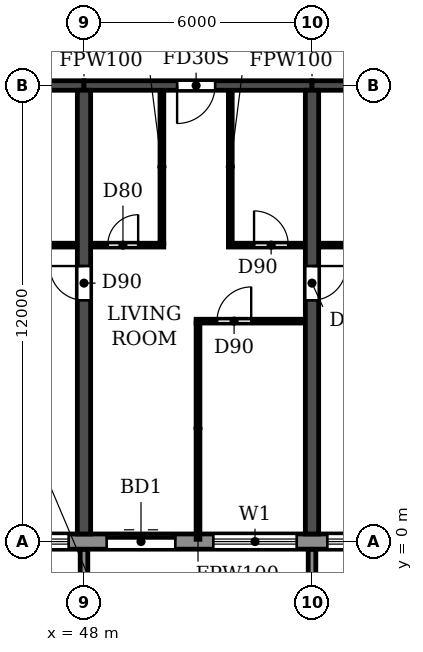
"""IFC4 building model, lengths in metres.
Left out: names, types, materials, properties, quantities, classifications, styles, units other than length and angle.
Written with IfcOpenShell. Run it as: python <this file> out.ifc"""

import sys

from ifc_helpers import new_model, si_unit, direction, frame, frame_2d, origin, place, context, subcontext, project, spatial, polyline, rectangle, outline, extrude, source, transform, mapped, element, fill, save


model = new_model("IFC4")
c1 = context("Model", 3, precision=1e-05, world=origin(), true_north=direction((0.0, 1.0)))
c2 = subcontext(c1, "Body", "Model", "MODEL_VIEW")
j1 = project(units=[si_unit("LENGTHUNIT", "METRE"), si_unit("PLANEANGLEUNIT", "RADIAN")], contexts=[c1])
p1 = place(None, origin())
s1 = spatial("IfcSite", under=j1, at=p1, CompositionType="ELEMENT")
p2 = place(p1, origin())
s2 = spatial("IfcBuilding", under=s1, at=p2, CompositionType="ELEMENT")
p3 = place(p2, frame((0.0, 0.0, 92.7)))
s3 = spatial("IfcBuildingStorey", under=s2, at=p3, CompositionType="ELEMENT", Elevation=92.7)
p4 = place(p3, frame((48.0, 0.2, 0.0), z_axis=(0.0, 0.0, 1.0), x_axis=(0.0, 1.0, 0.0)))
e1 = element("IfcWall", 1, at=p4, inside=s3, PredefinedType="SHEAR", context=c2, shape_type="SweptSolid", body=[
    extrude(rectangle(XDim=11.675, YDim=0.35, at=frame_2d((5.837, 0.0))), origin(), (0.0, 0.0, 1.0), 3.06),
])
p5 = place(p4, frame((6.15, 0.0, 0.0)))
e2 = element("IfcOpeningElement", 2, at=p5, cuts=e1, PredefinedType="OPENING", context=c2, shape_type="SweptSolid", body=[
    extrude(rectangle(XDim=0.9, YDim=2.1, at=frame_2d((0.45, 1.05))), frame((0.0, 0.185, 0.0), z_axis=(0.0, -1.0, 0.0), x_axis=(1.0, 0.0, 0.0)), (0.0, 0.0, 1.0), 0.37),
])
p6 = place(p3, frame((54.0, 0.2, 0.0), z_axis=(0.0, 0.0, 1.0), x_axis=(0.0, 1.0, 0.0)))
e3 = element("IfcWall", 3, at=p6, inside=s3, PredefinedType="SHEAR", context=c2, shape_type="SweptSolid", body=[
    extrude(rectangle(XDim=11.675, YDim=0.35, at=frame_2d((5.837, 0.0))), origin(), (0.0, 0.0, 1.0), 3.06),
])
p7 = place(p6, frame((6.15, 0.0, 0.0)))
e4 = element("IfcOpeningElement", 4, at=p7, cuts=e3, PredefinedType="OPENING", context=c2, shape_type="SweptSolid", body=[
    extrude(rectangle(XDim=0.9, YDim=2.1, at=frame_2d((0.45, 1.05))), frame((0.0, 0.185, 0.0), z_axis=(0.0, -1.0, 0.0), x_axis=(1.0, 0.0, 0.0)), (0.0, 0.0, 1.0), 0.37),
])
p8 = place(p3, frame((42.0, 12.0, 0.0), z_axis=(0.0, 0.0, 1.0), x_axis=(1.0, 0.0, 0.0)))
e5 = element("IfcWall", 5, at=p8, inside=s3, PredefinedType="SHEAR", context=c2, shape_type="SweptSolid", body=[
    extrude(rectangle(XDim=6.0, YDim=0.25, at=frame_2d((3.0, 0.0))), origin(), (0.0, 0.0, 1.0), 2.46),
])
p9 = place(p3, frame((48.0, 12.0, 0.0), z_axis=(0.0, 0.0, 1.0), x_axis=(1.0, 0.0, 0.0)))
e6 = element("IfcWall", 6, at=p9, inside=s3, PredefinedType="SHEAR", context=c2, shape_type="SweptSolid", body=[
    extrude(rectangle(XDim=6.0, YDim=0.25, at=frame_2d((3.0, 0.0))), origin(), (0.0, 0.0, 1.0), 2.46),
])
p10 = place(p9, frame((2.45, 0.0, 0.0)))
e7 = element("IfcOpeningElement", 7, at=p10, cuts=e6, PredefinedType="OPENING", context=c2, shape_type="SweptSolid", body=[
    extrude(rectangle(XDim=1.0, YDim=2.1, at=frame_2d((0.5, 1.05))), frame((0.0, 0.135, 0.0), z_axis=(0.0, -1.0, 0.0), x_axis=(1.0, 0.0, 0.0)), (0.0, 0.0, 1.0), 0.27),
])
p11 = place(p3, frame((54.0, 12.0, 0.0), z_axis=(0.0, 0.0, 1.0), x_axis=(1.0, 0.0, 0.0)))
e8 = element("IfcWall", 8, at=p11, inside=s3, PredefinedType="SHEAR", context=c2, shape_type="SweptSolid", body=[
    extrude(rectangle(XDim=6.0, YDim=0.25, at=frame_2d((3.0, 0.0))), origin(), (0.0, 0.0, 1.0), 2.46),
])
p12 = place(p3, frame((10.683, 0.0, 0.0), z_axis=(0.0, 0.0, 1.0), x_axis=(1.0, 0.0, 0.0)))
e9 = element("IfcWall", 9, at=p12, inside=s3, PredefinedType="STANDARD", context=c2, shape_type="SweptSolid", body=[
    extrude(rectangle(XDim=80.634, YDim=0.4, at=frame_2d((40.317, 0.0))), origin(), (0.0, 0.0, 1.0), 3.06),
])
p13 = place(p12, frame((1.717, 0.0, 0.9)))
e10 = element("IfcOpeningElement", 10, at=p13, cuts=e9, PredefinedType="OPENING", context=c2, shape_type="SweptSolid", body=[
    extrude(rectangle(XDim=2.2, YDim=1.5, at=frame_2d((1.1, 0.75))), frame((0.0, 0.21, 0.0), z_axis=(0.0, -1.0, 0.0), x_axis=(1.0, 0.0, 0.0)), (0.0, 0.0, 1.0), 0.42),
])
p14 = place(p12, frame((4.917, 0.0, 0.0)))
e11 = element("IfcOpeningElement", 11, at=p14, cuts=e9, PredefinedType="OPENING", context=c2, shape_type="SweptSolid", body=[
    extrude(rectangle(XDim=1.8, YDim=2.4, at=frame_2d((0.9, 1.2))), frame((0.0, 0.21, 0.0), z_axis=(0.0, -1.0, 0.0), x_axis=(1.0, 0.0, 0.0)), (0.0, 0.0, 1.0), 0.42),
])
p15 = place(p12, frame((7.717, 0.0, 0.9)))
e12 = element("IfcOpeningElement", 12, at=p15, cuts=e9, PredefinedType="OPENING", context=c2, shape_type="SweptSolid", body=[
    extrude(rectangle(XDim=2.2, YDim=1.5, at=frame_2d((1.1, 0.75))), frame((0.0, 0.21, 0.0), z_axis=(0.0, -1.0, 0.0), x_axis=(1.0, 0.0, 0.0)), (0.0, 0.0, 1.0), 0.42),
])
p16 = place(p12, frame((10.717, 0.0, 0.9)))
e13 = element("IfcOpeningElement", 13, at=p16, cuts=e9, PredefinedType="OPENING", context=c2, shape_type="SweptSolid", body=[
    extrude(rectangle(XDim=2.2, YDim=1.5, at=frame_2d((1.1, 0.75))), frame((0.0, 0.21, 0.0), z_axis=(0.0, -1.0, 0.0), x_axis=(1.0, 0.0, 0.0)), (0.0, 0.0, 1.0), 0.42),
])
p17 = place(p12, frame((13.717, 0.0, 0.9)))
e14 = element("IfcOpeningElement", 14, at=p17, cuts=e9, PredefinedType="OPENING", context=c2, shape_type="SweptSolid", body=[
    extrude(rectangle(XDim=2.2, YDim=1.5, at=frame_2d((1.1, 0.75))), frame((0.0, 0.21, 0.0), z_axis=(0.0, -1.0, 0.0), x_axis=(1.0, 0.0, 0.0)), (0.0, 0.0, 1.0), 0.42),
])
p18 = place(p12, frame((16.717, 0.0, 0.9)))
e15 = element("IfcOpeningElement", 15, at=p18, cuts=e9, PredefinedType="OPENING", context=c2, shape_type="SweptSolid", body=[
    extrude(rectangle(XDim=2.2, YDim=1.5, at=frame_2d((1.1, 0.75))), frame((0.0, 0.21, 0.0), z_axis=(0.0, -1.0, 0.0), x_axis=(1.0, 0.0, 0.0)), (0.0, 0.0, 1.0), 0.42),
])
p19 = place(p12, frame((19.717, 0.0, 0.9)))
e16 = element("IfcOpeningElement", 16, at=p19, cuts=e9, PredefinedType="OPENING", context=c2, shape_type="SweptSolid", body=[
    extrude(rectangle(XDim=2.2, YDim=1.5, at=frame_2d((1.1, 0.75))), frame((0.0, 0.21, 0.0), z_axis=(0.0, -1.0, 0.0), x_axis=(1.0, 0.0, 0.0)), (0.0, 0.0, 1.0), 0.42),
])
p20 = place(p12, frame((22.717, 0.0, 0.9)))
e17 = element("IfcOpeningElement", 17, at=p20, cuts=e9, PredefinedType="OPENING", context=c2, shape_type="SweptSolid", body=[
    extrude(rectangle(XDim=2.2, YDim=1.5, at=frame_2d((1.1, 0.75))), frame((0.0, 0.21, 0.0), z_axis=(0.0, -1.0, 0.0), x_axis=(1.0, 0.0, 0.0)), (0.0, 0.0, 1.0), 0.42),
])
p21 = place(p12, frame((25.717, 0.0, 0.9)))
e18 = element("IfcOpeningElement", 18, at=p21, cuts=e9, PredefinedType="OPENING", context=c2, shape_type="SweptSolid", body=[
    extrude(rectangle(XDim=2.2, YDim=1.5, at=frame_2d((1.1, 0.75))), frame((0.0, 0.21, 0.0), z_axis=(0.0, -1.0, 0.0), x_axis=(1.0, 0.0, 0.0)), (0.0, 0.0, 1.0), 0.42),
])
p22 = place(p12, frame((28.917, 0.0, 0.0)))
e19 = element("IfcOpeningElement", 19, at=p22, cuts=e9, PredefinedType="OPENING", context=c2, shape_type="SweptSolid", body=[
    extrude(rectangle(XDim=1.8, YDim=2.4, at=frame_2d((0.9, 1.2))), frame((0.0, 0.21, 0.0), z_axis=(0.0, -1.0, 0.0), x_axis=(1.0, 0.0, 0.0)), (0.0, 0.0, 1.0), 0.42),
])
p23 = place(p12, frame((31.717, 0.0, 0.9)))
e20 = element("IfcOpeningElement", 20, at=p23, cuts=e9, PredefinedType="OPENING", context=c2, shape_type="SweptSolid", body=[
    extrude(rectangle(XDim=2.2, YDim=1.5, at=frame_2d((1.1, 0.75))), frame((0.0, 0.21, 0.0), z_axis=(0.0, -1.0, 0.0), x_axis=(1.0, 0.0, 0.0)), (0.0, 0.0, 1.0), 0.42),
])
p24 = place(p12, frame((34.717, 0.0, 0.9)))
e21 = element("IfcOpeningElement", 21, at=p24, cuts=e9, PredefinedType="OPENING", context=c2, shape_type="SweptSolid", body=[
    extrude(rectangle(XDim=2.2, YDim=1.5, at=frame_2d((1.1, 0.75))), frame((0.0, 0.21, 0.0), z_axis=(0.0, -1.0, 0.0), x_axis=(1.0, 0.0, 0.0)), (0.0, 0.0, 1.0), 0.42),
])
p25 = place(p12, frame((37.917, 0.0, 0.0)))
e22 = element("IfcOpeningElement", 22, at=p25, cuts=e9, PredefinedType="OPENING", context=c2, shape_type="SweptSolid", body=[
    extrude(rectangle(XDim=1.8, YDim=2.4, at=frame_2d((0.9, 1.2))), frame((0.0, 0.21, 0.0), z_axis=(0.0, -1.0, 0.0), x_axis=(1.0, 0.0, 0.0)), (0.0, 0.0, 1.0), 0.42),
])
p26 = place(p12, frame((40.717, 0.0, 0.9)))
e23 = element("IfcOpeningElement", 23, at=p26, cuts=e9, PredefinedType="OPENING", context=c2, shape_type="SweptSolid", body=[
    extrude(rectangle(XDim=2.2, YDim=1.5, at=frame_2d((1.1, 0.75))), frame((0.0, 0.21, 0.0), z_axis=(0.0, -1.0, 0.0), x_axis=(1.0, 0.0, 0.0)), (0.0, 0.0, 1.0), 0.42),
])
p27 = place(p12, frame((43.717, 0.0, 0.9)))
e24 = element("IfcOpeningElement", 24, at=p27, cuts=e9, PredefinedType="OPENING", context=c2, shape_type="SweptSolid", body=[
    extrude(rectangle(XDim=2.2, YDim=1.5, at=frame_2d((1.1, 0.75))), frame((0.0, 0.21, 0.0), z_axis=(0.0, -1.0, 0.0), x_axis=(1.0, 0.0, 0.0)), (0.0, 0.0, 1.0), 0.42),
])
p28 = place(p12, frame((46.717, 0.0, 0.9)))
e25 = element("IfcOpeningElement", 25, at=p28, cuts=e9, PredefinedType="OPENING", context=c2, shape_type="SweptSolid", body=[
    extrude(rectangle(XDim=2.2, YDim=1.5, at=frame_2d((1.1, 0.75))), frame((0.0, 0.21, 0.0), z_axis=(0.0, -1.0, 0.0), x_axis=(1.0, 0.0, 0.0)), (0.0, 0.0, 1.0), 0.42),
])
p29 = place(p12, frame((49.717, 0.0, 0.9)))
e26 = element("IfcOpeningElement", 26, at=p29, cuts=e9, PredefinedType="OPENING", context=c2, shape_type="SweptSolid", body=[
    extrude(rectangle(XDim=2.2, YDim=1.5, at=frame_2d((1.1, 0.75))), frame((0.0, 0.21, 0.0), z_axis=(0.0, -1.0, 0.0), x_axis=(1.0, 0.0, 0.0)), (0.0, 0.0, 1.0), 0.42),
])
p30 = place(p12, frame((52.917, 0.0, 0.0)))
e27 = element("IfcOpeningElement", 27, at=p30, cuts=e9, PredefinedType="OPENING", context=c2, shape_type="SweptSolid", body=[
    extrude(rectangle(XDim=1.8, YDim=2.4, at=frame_2d((0.9, 1.2))), frame((0.0, 0.21, 0.0), z_axis=(0.0, -1.0, 0.0), x_axis=(1.0, 0.0, 0.0)), (0.0, 0.0, 1.0), 0.42),
])
p31 = place(p12, frame((55.717, 0.0, 0.9)))
e28 = element("IfcOpeningElement", 28, at=p31, cuts=e9, PredefinedType="OPENING", context=c2, shape_type="SweptSolid", body=[
    extrude(rectangle(XDim=2.2, YDim=1.5, at=frame_2d((1.1, 0.75))), frame((0.0, 0.21, 0.0), z_axis=(0.0, -1.0, 0.0), x_axis=(1.0, 0.0, 0.0)), (0.0, 0.0, 1.0), 0.42),
])
p32 = place(p12, frame((58.717, 0.0, 0.9)))
e29 = element("IfcOpeningElement", 29, at=p32, cuts=e9, PredefinedType="OPENING", context=c2, shape_type="SweptSolid", body=[
    extrude(rectangle(XDim=2.2, YDim=1.5, at=frame_2d((1.1, 0.75))), frame((0.0, 0.21, 0.0), z_axis=(0.0, -1.0, 0.0), x_axis=(1.0, 0.0, 0.0)), (0.0, 0.0, 1.0), 0.42),
])
p33 = place(p12, frame((61.717, 0.0, 0.9)))
e30 = element("IfcOpeningElement", 30, at=p33, cuts=e9, PredefinedType="OPENING", context=c2, shape_type="SweptSolid", body=[
    extrude(rectangle(XDim=2.2, YDim=1.5, at=frame_2d((1.1, 0.75))), frame((0.0, 0.21, 0.0), z_axis=(0.0, -1.0, 0.0), x_axis=(1.0, 0.0, 0.0)), (0.0, 0.0, 1.0), 0.42),
])
p34 = place(p12, frame((64.917, 0.0, 0.0)))
e31 = element("IfcOpeningElement", 31, at=p34, cuts=e9, PredefinedType="OPENING", context=c2, shape_type="SweptSolid", body=[
    extrude(rectangle(XDim=1.8, YDim=2.4, at=frame_2d((0.9, 1.2))), frame((0.0, 0.21, 0.0), z_axis=(0.0, -1.0, 0.0), x_axis=(1.0, 0.0, 0.0)), (0.0, 0.0, 1.0), 0.42),
])
p35 = place(p12, frame((67.717, 0.0, 0.9)))
e32 = element("IfcOpeningElement", 32, at=p35, cuts=e9, PredefinedType="OPENING", context=c2, shape_type="SweptSolid", body=[
    extrude(rectangle(XDim=2.2, YDim=1.5, at=frame_2d((1.1, 0.75))), frame((0.0, 0.21, 0.0), z_axis=(0.0, -1.0, 0.0), x_axis=(1.0, 0.0, 0.0)), (0.0, 0.0, 1.0), 0.42),
])
p36 = place(p12, frame((70.717, 0.0, 0.9)))
e33 = element("IfcOpeningElement", 33, at=p36, cuts=e9, PredefinedType="OPENING", context=c2, shape_type="SweptSolid", body=[
    extrude(rectangle(XDim=2.2, YDim=1.5, at=frame_2d((1.1, 0.75))), frame((0.0, 0.21, 0.0), z_axis=(0.0, -1.0, 0.0), x_axis=(1.0, 0.0, 0.0)), (0.0, 0.0, 1.0), 0.42),
])
p37 = place(p12, frame((73.917, 0.0, 0.0)))
e34 = element("IfcOpeningElement", 34, at=p37, cuts=e9, PredefinedType="OPENING", context=c2, shape_type="SweptSolid", body=[
    extrude(rectangle(XDim=1.8, YDim=2.4, at=frame_2d((0.9, 1.2))), frame((0.0, 0.21, 0.0), z_axis=(0.0, -1.0, 0.0), x_axis=(1.0, 0.0, 0.0)), (0.0, 0.0, 1.0), 0.42),
])
p38 = place(p12, frame((76.717, 0.0, 0.9)))
e35 = element("IfcOpeningElement", 35, at=p38, cuts=e9, PredefinedType="OPENING", context=c2, shape_type="SweptSolid", body=[
    extrude(rectangle(XDim=2.2, YDim=1.5, at=frame_2d((1.1, 0.75))), frame((0.0, 0.21, 0.0), z_axis=(0.0, -1.0, 0.0), x_axis=(1.0, 0.0, 0.0)), (0.0, 0.0, 1.0), 0.42),
])
m1 = source(origin(), c2, "Body", "SweptSolid", [
    extrude(outline(polyline([(0.0, 0.0), (0.2, 0.0), (0.2, 1.65), (0.0, 1.65), (0.0, 0.0)])), origin(), (0.0, 0.0, 1.0), 3.1),
])
for number, where in (
    (36, (47.9, -1.85, 0.0)),
    (37, (53.9, -1.85, 0.0)),
):
    element("IfcWall", number, at=place(p3, frame(where)), inside=s3, PredefinedType="STANDARD", context=c2, shape_type="MappedRepresentation", body=[
        mapped(m1, transform((0.0, 0.0, 0.0))),
    ])
p39 = place(p3, frame((50.95, 5.8, 0.0), z_axis=(0.0, 0.0, 1.0), x_axis=(1.0, 0.0, 0.0)))
e38 = element("IfcWall", 38, at=p39, inside=s3, PredefinedType="PARTITIONING", context=c2, shape_type="SweptSolid", body=[
    extrude(rectangle(XDim=2.865, YDim=0.1, at=frame_2d((1.433, 0.0))), origin(), (0.0, 0.0, 1.0), 3.06),
])
p40 = place(p39, frame((0.55, 0.0, 0.0)))
e39 = element("IfcOpeningElement", 39, at=p40, cuts=e38, PredefinedType="OPENING", context=c2, shape_type="SweptSolid", body=[
    extrude(rectangle(XDim=0.9, YDim=2.1, at=frame_2d((0.45, 1.05))), frame((0.0, 0.06, 0.0), z_axis=(0.0, -1.0, 0.0), x_axis=(1.0, 0.0, 0.0)), (0.0, 0.0, 1.0), 0.12),
])
p41 = place(p3, frame((44.9, 7.8, 0.0), z_axis=(0.0, 0.0, 1.0), x_axis=(1.0, 0.0, 0.0)))
e40 = element("IfcWall", 40, at=p41, inside=s3, PredefinedType="PARTITIONING", context=c2, shape_type="SweptSolid", body=[
    extrude(rectangle(XDim=2.915, YDim=0.1, at=frame_2d((1.458, 0.0))), origin(), (0.0, 0.0, 1.0), 3.06),
])
p42 = place(p41, frame((1.2, 0.0, 0.0)))
e41 = element("IfcOpeningElement", 41, at=p42, cuts=e40, PredefinedType="OPENING", context=c2, shape_type="SweptSolid", body=[
    extrude(rectangle(XDim=0.8, YDim=2.1, at=frame_2d((0.4, 1.05))), frame((0.0, 0.06, 0.0), z_axis=(0.0, -1.0, 0.0), x_axis=(1.0, 0.0, 0.0)), (0.0, 0.0, 1.0), 0.12),
])
p43 = place(p3, frame((48.185, 7.8, 0.0), z_axis=(0.0, 0.0, 1.0), x_axis=(1.0, 0.0, 0.0)))
e42 = element("IfcWall", 42, at=p43, inside=s3, PredefinedType="PARTITIONING", context=c2, shape_type="SweptSolid", body=[
    extrude(rectangle(XDim=1.915, YDim=0.1, at=frame_2d((0.958, 0.0))), origin(), (0.0, 0.0, 1.0), 3.06),
])
p44 = place(p43, frame((0.44, 0.0, 0.0)))
e43 = element("IfcOpeningElement", 43, at=p44, cuts=e42, PredefinedType="OPENING", context=c2, shape_type="SweptSolid", body=[
    extrude(rectangle(XDim=0.8, YDim=2.1, at=frame_2d((0.4, 1.05))), frame((0.0, 0.06, 0.0), z_axis=(0.0, -1.0, 0.0), x_axis=(1.0, 0.0, 0.0)), (0.0, 0.0, 1.0), 0.12),
])
p45 = place(p3, frame((51.8, 7.8, 0.0), z_axis=(0.0, 0.0, 1.0), x_axis=(1.0, 0.0, 0.0)))
e44 = element("IfcWall", 44, at=p45, inside=s3, PredefinedType="PARTITIONING", context=c2, shape_type="SweptSolid", body=[
    extrude(rectangle(XDim=2.015, YDim=0.1, at=frame_2d((1.007, 0.0))), origin(), (0.0, 0.0, 1.0), 3.06),
])
p46 = place(p45, frame((0.675, 0.0, 0.0)))
e45 = element("IfcOpeningElement", 45, at=p46, cuts=e44, PredefinedType="OPENING", context=c2, shape_type="SweptSolid", body=[
    extrude(rectangle(XDim=0.9, YDim=2.1, at=frame_2d((0.45, 1.05))), frame((0.0, 0.06, 0.0), z_axis=(0.0, -1.0, 0.0), x_axis=(1.0, 0.0, 0.0)), (0.0, 0.0, 1.0), 0.12),
])
p47 = place(p3, frame((54.185, 7.8, 0.0), z_axis=(0.0, 0.0, 1.0), x_axis=(1.0, 0.0, 0.0)))
e46 = element("IfcWall", 46, at=p47, inside=s3, PredefinedType="PARTITIONING", context=c2, shape_type="SweptSolid", body=[
    extrude(rectangle(XDim=2.715, YDim=0.1, at=frame_2d((1.357, 0.0))), origin(), (0.0, 0.0, 1.0), 3.06),
])
p48 = place(p47, frame((0.915, 0.0, 0.0)))
e47 = element("IfcOpeningElement", 47, at=p48, cuts=e46, PredefinedType="OPENING", context=c2, shape_type="SweptSolid", body=[
    extrude(rectangle(XDim=0.8, YDim=2.1, at=frame_2d((0.4, 1.05))), frame((0.0, 0.06, 0.0), z_axis=(0.0, -1.0, 0.0), x_axis=(1.0, 0.0, 0.0)), (0.0, 0.0, 1.0), 0.12),
])
p49 = place(p3, frame((50.05, 7.85, 0.0), z_axis=(0.0, 0.0, 1.0), x_axis=(0.0, 1.0, 0.0)))
e48 = element("IfcWall", 48, at=p49, inside=s3, PredefinedType="PARTITIONING", context=c2, shape_type="SweptSolid", body=[
    extrude(rectangle(XDim=4.015, YDim=0.1, at=frame_2d((2.007, 0.0))), origin(), (0.0, 0.0, 1.0), 3.06),
])
p50 = place(p3, frame((51.0, 0.06, 0.0), z_axis=(0.0, 0.0, 1.0), x_axis=(0.0, 1.0, 0.0)))
e49 = element("IfcWall", 49, at=p50, inside=s3, PredefinedType="PARTITIONING", context=c2, shape_type="SweptSolid", body=[
    extrude(rectangle(XDim=5.69, YDim=0.1, at=frame_2d((2.845, 0.0))), origin(), (0.0, 0.0, 1.0), 3.06),
])
p51 = place(p3, frame((51.85, 7.85, 0.0), z_axis=(0.0, 0.0, 1.0), x_axis=(0.0, 1.0, 0.0)))
e50 = element("IfcWall", 50, at=p51, inside=s3, PredefinedType="PARTITIONING", context=c2, shape_type="SweptSolid", body=[
    extrude(rectangle(XDim=4.015, YDim=0.1, at=frame_2d((2.007, 0.0))), origin(), (0.0, 0.0, 1.0), 3.06),
])
p52 = place(p24, origin())
e51 = element("IfcWindow", 51, at=p52, inside=s3, PartitioningType="DOUBLE_PANEL_HORIZONTAL", PredefinedType="WINDOW", context=c2, shape_type="SweptSolid", body=[
    extrude(rectangle(XDim=2.2, YDim=1.5, at=frame_2d((1.1, 0.75))), frame((0.0, 0.03, 0.0), z_axis=(0.0, -1.0, 0.0), x_axis=(1.0, 0.0, 0.0)), (0.0, 0.0, 1.0), 0.06),
])
fill(e21, e51)
p53 = place(p25, origin())
e52 = element("IfcDoor", 52, at=p53, inside=s3, OperationType="DOUBLE_DOOR_SLIDING", PredefinedType="DOOR", context=c2, shape_type="SweptSolid", body=[
    extrude(rectangle(XDim=1.8, YDim=2.4, at=frame_2d((0.9, 1.2))), frame((0.0, 0.025, 0.0), z_axis=(0.0, -1.0, 0.0), x_axis=(1.0, 0.0, 0.0)), (0.0, 0.0, 1.0), 0.05),
])
fill(e22, e52)
p54 = place(p26, origin())
e53 = element("IfcWindow", 53, at=p54, inside=s3, PartitioningType="DOUBLE_PANEL_HORIZONTAL", PredefinedType="WINDOW", context=c2, shape_type="SweptSolid", body=[
    extrude(rectangle(XDim=2.2, YDim=1.5, at=frame_2d((1.1, 0.75))), frame((0.0, 0.03, 0.0), z_axis=(0.0, -1.0, 0.0), x_axis=(1.0, 0.0, 0.0)), (0.0, 0.0, 1.0), 0.06),
])
fill(e23, e53)
p55 = place(p27, origin())
e54 = element("IfcWindow", 54, at=p55, inside=s3, PartitioningType="DOUBLE_PANEL_HORIZONTAL", PredefinedType="WINDOW", context=c2, shape_type="SweptSolid", body=[
    extrude(rectangle(XDim=2.2, YDim=1.5, at=frame_2d((1.1, 0.75))), frame((0.0, 0.03, 0.0), z_axis=(0.0, -1.0, 0.0), x_axis=(1.0, 0.0, 0.0)), (0.0, 0.0, 1.0), 0.06),
])
fill(e24, e54)
p56 = place(p5, origin())
e55 = element("IfcDoor", 55, at=p56, inside=s3, OperationType="SINGLE_SWING_RIGHT", PredefinedType="DOOR", context=c2, shape_type="SweptSolid", body=[
    extrude(rectangle(XDim=0.9, YDim=2.1, at=frame_2d((0.45, 1.05))), frame((0.0, 0.025, 0.0), z_axis=(0.0, -1.0, 0.0), x_axis=(1.0, 0.0, 0.0)), (0.0, 0.0, 1.0), 0.05),
])
fill(e2, e55)
p57 = place(p44, origin())
e56 = element("IfcDoor", 56, at=p57, inside=s3, OperationType="SINGLE_SWING_RIGHT", PredefinedType="DOOR", context=c2, shape_type="SweptSolid", body=[
    extrude(rectangle(XDim=0.8, YDim=2.1, at=frame_2d((0.4, 1.05))), frame((0.0, 0.025, 0.0), z_axis=(0.0, -1.0, 0.0), x_axis=(1.0, 0.0, 0.0)), (0.0, 0.0, 1.0), 0.05),
])
fill(e43, e56)
p58 = place(p10, frame((1.0, 0.0, 0.0), z_axis=(0.0, 0.0, 1.0), x_axis=(-1.0, 0.0, 0.0)))
e57 = element("IfcDoor", 57, at=p58, inside=s3, OperationType="SINGLE_SWING_RIGHT", PredefinedType="DOOR", context=c2, shape_type="SweptSolid", body=[
    extrude(rectangle(XDim=1.0, YDim=2.1, at=frame_2d((0.5, 1.05))), frame((0.0, 0.025, 0.0), z_axis=(0.0, -1.0, 0.0), x_axis=(1.0, 0.0, 0.0)), (0.0, 0.0, 1.0), 0.05),
])
fill(e7, e57)
p59 = place(p40, origin())
e58 = element("IfcDoor", 58, at=p59, inside=s3, OperationType="SINGLE_SWING_RIGHT", PredefinedType="DOOR", context=c2, shape_type="SweptSolid", body=[
    extrude(rectangle(XDim=0.9, YDim=2.1, at=frame_2d((0.45, 1.05))), frame((0.0, 0.025, 0.0), z_axis=(0.0, -1.0, 0.0), x_axis=(1.0, 0.0, 0.0)), (0.0, 0.0, 1.0), 0.05),
])
fill(e39, e58)
p60 = place(p46, origin())
e59 = element("IfcDoor", 59, at=p60, inside=s3, OperationType="SINGLE_SWING_LEFT", PredefinedType="DOOR", context=c2, shape_type="SweptSolid", body=[
    extrude(rectangle(XDim=0.9, YDim=2.1, at=frame_2d((0.45, 1.05))), frame((0.0, 0.025, 0.0), z_axis=(0.0, -1.0, 0.0), x_axis=(1.0, 0.0, 0.0)), (0.0, 0.0, 1.0), 0.05),
])
fill(e45, e59)
p61 = place(p7, frame((0.9, 0.0, 0.0), z_axis=(0.0, 0.0, 1.0), x_axis=(-1.0, 0.0, 0.0)))
e60 = element("IfcDoor", 60, at=p61, inside=s3, OperationType="SINGLE_SWING_LEFT", PredefinedType="DOOR", context=c2, shape_type="SweptSolid", body=[
    extrude(rectangle(XDim=0.9, YDim=2.1, at=frame_2d((0.45, 1.05))), frame((0.0, 0.025, 0.0), z_axis=(0.0, -1.0, 0.0), x_axis=(1.0, 0.0, 0.0)), (0.0, 0.0, 1.0), 0.05),
])
fill(e4, e60)
save(model, sys.argv[1])
